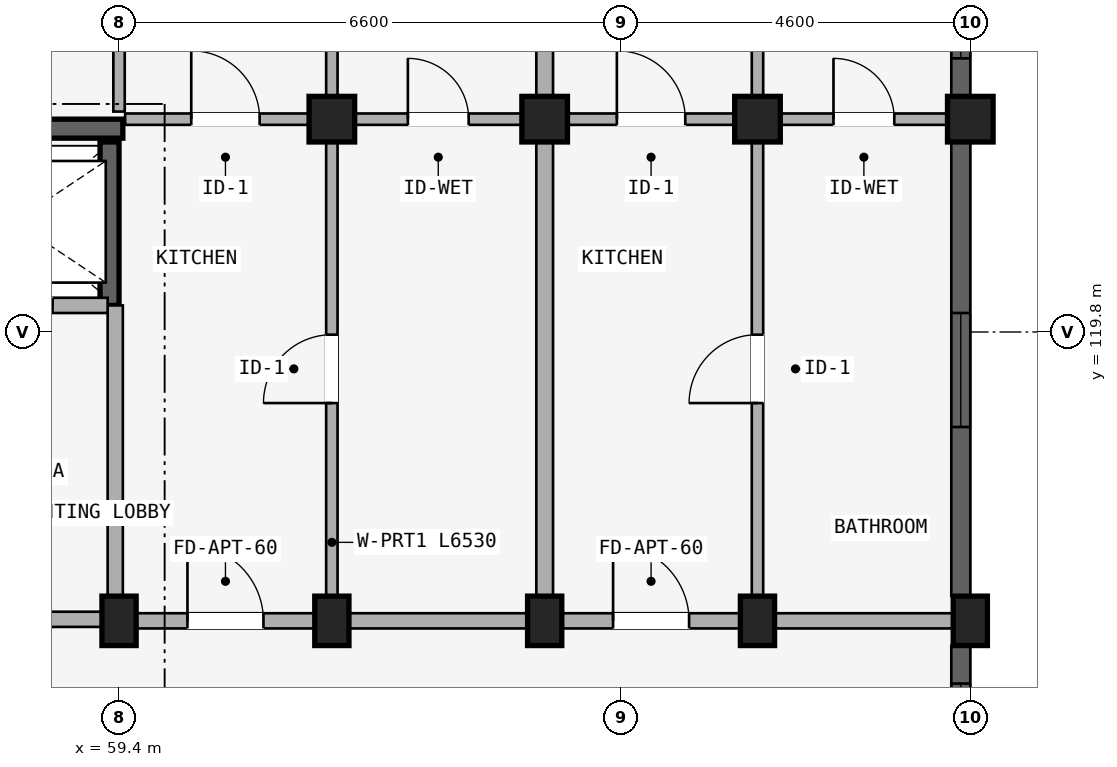
"""IFC4 building model, lengths in metres.
Left out: names, types, materials, properties, quantities, classifications, styles, units other than length and angle.
Written with IfcOpenShell. Run it as: python <this file> out.ifc"""

import sys

from ifc_helpers import new_model, si_unit, direction, frame, frame_2d, origin, origin_2d, place, context, subcontext, project, spatial, rectangle, extrude, element, fill, save


model = new_model("IFC4")
c1 = context("Model", 3, precision=1e-05, world=origin(), true_north=direction((0.0, 1.0)))
c2 = subcontext(c1, "Body", "Model", "MODEL_VIEW")
j1 = project(units=[si_unit("LENGTHUNIT", "METRE"), si_unit("PLANEANGLEUNIT", "RADIAN")], contexts=[c1])
p1 = place(None, origin())
s1 = spatial("IfcSite", under=j1, at=p1, CompositionType="ELEMENT")
p2 = place(p1, origin())
s2 = spatial("IfcBuilding", under=s1, at=p2, CompositionType="ELEMENT")
p3 = place(p2, frame((0.0, 0.0, 37.05)))
s3 = spatial("IfcBuildingStorey", under=s2, at=p3, CompositionType="ELEMENT", Elevation=37.05)
p4 = place(p3, frame((56.65, 122.475, 0.0), z_axis=(0.0, 0.0, 1.0), x_axis=(1.0, 0.0, 0.0)))
e1 = element("IfcWall", 1, at=p4, inside=s3, PredefinedType="SHEAR", context=c2, shape_type="SweptSolid", body=[
    extrude(rectangle(XDim=2.8, YDim=0.25, at=frame_2d((1.4, 0.0))), origin(), (0.0, 0.0, 1.0), 2.93),
])
p5 = place(p3, frame((59.275, 120.15, 0.0), z_axis=(0.0, 0.0, 1.0), x_axis=(0.0, 1.0, 0.0)))
e2 = element("IfcWall", 2, at=p5, inside=s3, PredefinedType="SHEAR", context=c2, shape_type="SweptSolid", body=[
    extrude(rectangle(XDim=2.15, YDim=0.25, at=frame_2d((1.075, 0.0))), origin(), (0.0, 0.0, 1.0), 2.93),
])
for number, where, z_axis, x_axis in (
    (3, (59.4, 116.0, 0.0), (0.0, 0.0, 1.0), (1.0, 0.0, 0.0)),
    (4, (62.2, 116.0, 0.0), (0.0, 0.0, 1.0), (1.0, 0.0, 0.0)),
):
    element("IfcColumn", number, at=place(p3, frame(where, z_axis=z_axis, x_axis=x_axis)), inside=s3, PredefinedType="COLUMN", context=c2, shape_type="SweptSolid", body=[
        extrude(rectangle(XDim=0.45, YDim=0.65, at=origin_2d()), origin(), (0.0, 0.0, 1.0), 2.93),
    ])
p6 = place(p3, frame((62.2, 122.6, 0.0), z_axis=(0.0, 0.0, 1.0), x_axis=(1.0, 0.0, 0.0)))
e5 = element("IfcColumn", 5, at=p6, inside=s3, PredefinedType="COLUMN", context=c2, shape_type="SweptSolid", body=[
    extrude(rectangle(XDim=0.6, YDim=0.6, at=origin_2d()), origin(), (0.0, 0.0, 1.0), 2.93),
])
p7 = place(p3, frame((65.0, 116.0, 0.0), z_axis=(0.0, 0.0, 1.0), x_axis=(1.0, 0.0, 0.0)))
e6 = element("IfcColumn", 6, at=p7, inside=s3, PredefinedType="COLUMN", context=c2, shape_type="SweptSolid", body=[
    extrude(rectangle(XDim=0.45, YDim=0.65, at=origin_2d()), origin(), (0.0, 0.0, 1.0), 2.93),
])
p8 = place(p3, frame((65.0, 122.6, 0.0), z_axis=(0.0, 0.0, 1.0), x_axis=(1.0, 0.0, 0.0)))
e7 = element("IfcColumn", 7, at=p8, inside=s3, PredefinedType="COLUMN", context=c2, shape_type="SweptSolid", body=[
    extrude(rectangle(XDim=0.6, YDim=0.6, at=origin_2d()), origin(), (0.0, 0.0, 1.0), 2.93),
])
p9 = place(p3, frame((67.8, 116.0, 0.0), z_axis=(0.0, 0.0, 1.0), x_axis=(1.0, 0.0, 0.0)))
e8 = element("IfcColumn", 8, at=p9, inside=s3, PredefinedType="COLUMN", context=c2, shape_type="SweptSolid", body=[
    extrude(rectangle(XDim=0.45, YDim=0.65, at=origin_2d()), origin(), (0.0, 0.0, 1.0), 2.93),
])
p10 = place(p3, frame((67.8, 122.6, 0.0), z_axis=(0.0, 0.0, 1.0), x_axis=(1.0, 0.0, 0.0)))
e9 = element("IfcColumn", 9, at=p10, inside=s3, PredefinedType="COLUMN", context=c2, shape_type="SweptSolid", body=[
    extrude(rectangle(XDim=0.6, YDim=0.6, at=origin_2d()), origin(), (0.0, 0.0, 1.0), 2.93),
])
p11 = place(p3, frame((70.6, 116.0, 0.0), z_axis=(0.0, 0.0, 1.0), x_axis=(1.0, 0.0, 0.0)))
e10 = element("IfcColumn", 10, at=p11, inside=s3, PredefinedType="COLUMN", context=c2, shape_type="SweptSolid", body=[
    extrude(rectangle(XDim=0.45, YDim=0.65, at=origin_2d()), origin(), (0.0, 0.0, 1.0), 2.93),
])
p12 = place(p3, frame((70.6, 122.6, 0.0), z_axis=(0.0, 0.0, 1.0), x_axis=(1.0, 0.0, 0.0)))
e11 = element("IfcColumn", 11, at=p12, inside=s3, PredefinedType="COLUMN", context=c2, shape_type="SweptSolid", body=[
    extrude(rectangle(XDim=0.6, YDim=0.6, at=origin_2d()), origin(), (0.0, 0.0, 1.0), 2.93),
])
p13 = place(p3, frame((53.7, 116.02, 0.0), z_axis=(0.0, 0.0, 1.0), x_axis=(1.0, 0.0, 0.0)))
e12 = element("IfcWall", 12, at=p13, inside=s3, PredefinedType="STANDARD", context=c2, shape_type="SweptSolid", body=[
    extrude(rectangle(XDim=5.65, YDim=0.2, at=frame_2d((2.825, 0.0))), origin(), (0.0, 0.0, 1.0), 2.372),
])
p14 = place(p13, frame((1.923, 0.0, 0.0)))
e13 = element("IfcOpeningElement", 13, at=p14, cuts=e12, PredefinedType="OPENING", context=c2, shape_type="SweptSolid", body=[
    extrude(rectangle(XDim=1.24, YDim=2.15, at=frame_2d((0.62, 1.075))), frame((0.0, 0.11, 0.0), z_axis=(0.0, -1.0, 0.0), x_axis=(1.0, 0.0, 0.0)), (0.0, 0.0, 1.0), 0.22),
])
p15 = place(p3, frame((59.35, 116.02, 0.0), z_axis=(0.0, 0.0, 1.0), x_axis=(0.0, 1.0, 0.0)))
e14 = element("IfcWall", 14, at=p15, inside=s3, PredefinedType="STANDARD", context=c2, shape_type="SweptSolid", body=[
    extrude(rectangle(XDim=4.13, YDim=0.2, at=frame_2d((2.065, 0.0))), origin(), (0.0, 0.0, 1.0), 2.372),
])
p16 = place(p3, frame((56.7, 120.15, 0.0), z_axis=(0.0, 0.0, 1.0), x_axis=(1.0, 0.0, 0.0)))
e15 = element("IfcWall", 15, at=p16, inside=s3, PredefinedType="STANDARD", context=c2, shape_type="SweptSolid", body=[
    extrude(rectangle(XDim=2.55, YDim=0.2, at=frame_2d((1.275, 0.0))), origin(), (0.0, 0.0, 1.0), 2.372),
])
p17 = place(p16, frame((0.725, 0.0, 0.0)))
e16 = element("IfcOpeningElement", 16, at=p17, cuts=e15, PredefinedType="OPENING", context=c2, shape_type="SweptSolid", body=[
    extrude(rectangle(XDim=1.1, YDim=2.15, at=frame_2d((0.55, 1.075))), frame((0.0, 0.11, 0.0), z_axis=(0.0, -1.0, 0.0), x_axis=(1.0, 0.0, 0.0)), (0.0, 0.0, 1.0), 0.22),
])
p18 = place(p3, frame((59.4, 116.0, 0.0), z_axis=(0.0, 0.0, 1.0), x_axis=(1.0, 0.0, 0.0)))
e17 = element("IfcWall", 17, at=p18, inside=s3, PredefinedType="STANDARD", context=c2, shape_type="SweptSolid", body=[
    extrude(rectangle(XDim=2.8, YDim=0.2, at=frame_2d((1.4, 0.0))), origin(), (0.0, 0.0, 1.0), 2.372),
])
p19 = place(p18, frame((0.9, 0.0, 0.0)))
e18 = element("IfcOpeningElement", 18, at=p19, cuts=e17, PredefinedType="OPENING", context=c2, shape_type="SweptSolid", body=[
    extrude(rectangle(XDim=1.0, YDim=2.15, at=frame_2d((0.5, 1.075))), frame((0.0, 0.11, 0.0), z_axis=(0.0, -1.0, 0.0), x_axis=(1.0, 0.0, 0.0)), (0.0, 0.0, 1.0), 0.22),
])
p20 = place(p3, frame((59.48, 122.6, 0.0), z_axis=(0.0, 0.0, 1.0), x_axis=(1.0, 0.0, 0.0)))
e19 = element("IfcWall", 19, at=p20, inside=s3, PredefinedType="PLUMBINGWALL", context=c2, shape_type="SweptSolid", body=[
    extrude(rectangle(XDim=2.64, YDim=0.15, at=frame_2d((1.32, 0.0))), origin(), (0.0, 0.0, 1.0), 2.372),
])
p21 = place(p20, frame((0.87, 0.0, 0.0)))
e20 = element("IfcOpeningElement", 20, at=p21, cuts=e19, PredefinedType="OPENING", context=c2, shape_type="SweptSolid", body=[
    extrude(rectangle(XDim=0.9, YDim=2.1, at=frame_2d((0.45, 1.05))), frame((0.0, 0.085, 0.0), z_axis=(0.0, -1.0, 0.0), x_axis=(1.0, 0.0, 0.0)), (0.0, 0.0, 1.0), 0.17),
])
p22 = place(p3, frame((62.2, 116.0, 0.0), z_axis=(0.0, 0.0, 1.0), x_axis=(1.0, 0.0, 0.0)))
e21 = element("IfcWall", 21, at=p22, inside=s3, PredefinedType="STANDARD", context=c2, shape_type="SweptSolid", body=[
    extrude(rectangle(XDim=2.8, YDim=0.2, at=frame_2d((1.4, 0.0))), origin(), (0.0, 0.0, 1.0), 2.372),
])
p23 = place(p3, frame((62.28, 122.6, 0.0), z_axis=(0.0, 0.0, 1.0), x_axis=(1.0, 0.0, 0.0)))
e22 = element("IfcWall", 22, at=p23, inside=s3, PredefinedType="PLUMBINGWALL", context=c2, shape_type="SweptSolid", body=[
    extrude(rectangle(XDim=2.64, YDim=0.15, at=frame_2d((1.32, 0.0))), origin(), (0.0, 0.0, 1.0), 2.372),
])
p24 = place(p23, frame((0.92, 0.0, 0.0)))
e23 = element("IfcOpeningElement", 23, at=p24, cuts=e22, PredefinedType="OPENING", context=c2, shape_type="SweptSolid", body=[
    extrude(rectangle(XDim=0.8, YDim=2.1, at=frame_2d((0.4, 1.05))), frame((0.0, 0.085, 0.0), z_axis=(0.0, -1.0, 0.0), x_axis=(1.0, 0.0, 0.0)), (0.0, 0.0, 1.0), 0.17),
])
p25 = place(p3, frame((65.0, 116.0, 0.0), z_axis=(0.0, 0.0, 1.0), x_axis=(1.0, 0.0, 0.0)))
e24 = element("IfcWall", 24, at=p25, inside=s3, PredefinedType="STANDARD", context=c2, shape_type="SweptSolid", body=[
    extrude(rectangle(XDim=2.8, YDim=0.2, at=frame_2d((1.4, 0.0))), origin(), (0.0, 0.0, 1.0), 2.372),
])
p26 = place(p25, frame((0.9, 0.0, 0.0)))
e25 = element("IfcOpeningElement", 25, at=p26, cuts=e24, PredefinedType="OPENING", context=c2, shape_type="SweptSolid", body=[
    extrude(rectangle(XDim=1.0, YDim=2.15, at=frame_2d((0.5, 1.075))), frame((0.0, 0.11, 0.0), z_axis=(0.0, -1.0, 0.0), x_axis=(1.0, 0.0, 0.0)), (0.0, 0.0, 1.0), 0.22),
])
p27 = place(p3, frame((65.08, 122.6, 0.0), z_axis=(0.0, 0.0, 1.0), x_axis=(1.0, 0.0, 0.0)))
e26 = element("IfcWall", 26, at=p27, inside=s3, PredefinedType="PLUMBINGWALL", context=c2, shape_type="SweptSolid", body=[
    extrude(rectangle(XDim=2.64, YDim=0.15, at=frame_2d((1.32, 0.0))), origin(), (0.0, 0.0, 1.0), 2.372),
])
p28 = place(p27, frame((0.87, 0.0, 0.0)))
e27 = element("IfcOpeningElement", 27, at=p28, cuts=e26, PredefinedType="OPENING", context=c2, shape_type="SweptSolid", body=[
    extrude(rectangle(XDim=0.9, YDim=2.1, at=frame_2d((0.45, 1.05))), frame((0.0, 0.085, 0.0), z_axis=(0.0, -1.0, 0.0), x_axis=(1.0, 0.0, 0.0)), (0.0, 0.0, 1.0), 0.17),
])
p29 = place(p3, frame((67.8, 116.0, 0.0), z_axis=(0.0, 0.0, 1.0), x_axis=(1.0, 0.0, 0.0)))
e28 = element("IfcWall", 28, at=p29, inside=s3, PredefinedType="STANDARD", context=c2, shape_type="SweptSolid", body=[
    extrude(rectangle(XDim=2.8, YDim=0.2, at=frame_2d((1.4, 0.0))), origin(), (0.0, 0.0, 1.0), 2.372),
])
p30 = place(p3, frame((67.88, 122.6, 0.0), z_axis=(0.0, 0.0, 1.0), x_axis=(1.0, 0.0, 0.0)))
e29 = element("IfcWall", 29, at=p30, inside=s3, PredefinedType="PLUMBINGWALL", context=c2, shape_type="SweptSolid", body=[
    extrude(rectangle(XDim=2.64, YDim=0.15, at=frame_2d((1.32, 0.0))), origin(), (0.0, 0.0, 1.0), 2.372),
])
p31 = place(p30, frame((0.92, 0.0, 0.0)))
e30 = element("IfcOpeningElement", 30, at=p31, cuts=e29, PredefinedType="OPENING", context=c2, shape_type="SweptSolid", body=[
    extrude(rectangle(XDim=0.8, YDim=2.1, at=frame_2d((0.4, 1.05))), frame((0.0, 0.085, 0.0), z_axis=(0.0, -1.0, 0.0), x_axis=(1.0, 0.0, 0.0)), (0.0, 0.0, 1.0), 0.17),
])
p32 = place(p3, frame((59.4, 122.7, 0.0), z_axis=(0.0, 0.0, 1.0), x_axis=(0.0, 1.0, 0.0)))
e31 = element("IfcWall", 31, at=p32, inside=s3, PredefinedType="PARTITIONING", context=c2, shape_type="SweptSolid", body=[
    extrude(rectangle(XDim=10.82, YDim=0.15, at=frame_2d((5.41, 0.0))), origin(), (0.0, 0.0, 1.0), 2.372),
])
p33 = place(p32, frame((0.899, 0.0, 0.0)))
e32 = element("IfcOpeningElement", 32, at=p33, cuts=e31, PredefinedType="OPENING", context=c2, shape_type="SweptSolid", body=[
    extrude(rectangle(XDim=0.8, YDim=2.1, at=frame_2d((0.4, 1.05))), frame((0.0, 0.085, 0.0), z_axis=(0.0, -1.0, 0.0), x_axis=(1.0, 0.0, 0.0)), (0.0, 0.0, 1.0), 0.17),
])
p34 = place(p3, frame((62.2, 116.05, 0.0), z_axis=(0.0, 0.0, 1.0), x_axis=(0.0, 1.0, 0.0)))
e33 = element("IfcWall", 33, at=p34, inside=s3, PredefinedType="PARTITIONING", context=c2, shape_type="SweptSolid", body=[
    extrude(rectangle(XDim=6.53, YDim=0.15, at=frame_2d((3.265, 0.0))), origin(), (0.0, 0.0, 1.0), 2.372),
])
p35 = place(p34, frame((2.815, 0.0, 0.0)))
e34 = element("IfcOpeningElement", 34, at=p35, cuts=e33, PredefinedType="OPENING", context=c2, shape_type="SweptSolid", body=[
    extrude(rectangle(XDim=0.9, YDim=2.1, at=frame_2d((0.45, 1.05))), frame((0.0, 0.085, 0.0), z_axis=(0.0, -1.0, 0.0), x_axis=(1.0, 0.0, 0.0)), (0.0, 0.0, 1.0), 0.17),
])
p36 = place(p3, frame((62.2, 122.7, 0.0), z_axis=(0.0, 0.0, 1.0), x_axis=(0.0, 1.0, 0.0)))
e35 = element("IfcWall", 35, at=p36, inside=s3, PredefinedType="PARTITIONING", context=c2, shape_type="SweptSolid", body=[
    extrude(rectangle(XDim=10.82, YDim=0.15, at=frame_2d((5.41, 0.0))), origin(), (0.0, 0.0, 1.0), 2.372),
])
p37 = place(p36, frame((0.899, 0.0, 0.0)))
e36 = element("IfcOpeningElement", 36, at=p37, cuts=e35, PredefinedType="OPENING", context=c2, shape_type="SweptSolid", body=[
    extrude(rectangle(XDim=0.8, YDim=2.1, at=frame_2d((0.4, 1.05))), frame((0.0, 0.085, 0.0), z_axis=(0.0, -1.0, 0.0), x_axis=(1.0, 0.0, 0.0)), (0.0, 0.0, 1.0), 0.17),
])
p38 = place(p3, frame((65.0, 116.05, 0.0), z_axis=(0.0, 0.0, 1.0), x_axis=(0.0, 1.0, 0.0)))
e37 = element("IfcWall", 37, at=p38, inside=s3, PredefinedType="STANDARD", context=c2, shape_type="SweptSolid", body=[
    extrude(rectangle(XDim=6.53, YDim=0.22, at=frame_2d((3.265, 0.0))), origin(), (0.0, 0.0, 1.0), 2.372),
])
p39 = place(p3, frame((65.0, 122.7, 0.0), z_axis=(0.0, 0.0, 1.0), x_axis=(0.0, 1.0, 0.0)))
e38 = element("IfcWall", 38, at=p39, inside=s3, PredefinedType="STANDARD", context=c2, shape_type="SweptSolid", body=[
    extrude(rectangle(XDim=10.82, YDim=0.22, at=frame_2d((5.41, 0.0))), origin(), (0.0, 0.0, 1.0), 2.372),
])
p40 = place(p3, frame((67.8, 116.05, 0.0), z_axis=(0.0, 0.0, 1.0), x_axis=(0.0, 1.0, 0.0)))
e39 = element("IfcWall", 39, at=p40, inside=s3, PredefinedType="PARTITIONING", context=c2, shape_type="SweptSolid", body=[
    extrude(rectangle(XDim=6.53, YDim=0.15, at=frame_2d((3.265, 0.0))), origin(), (0.0, 0.0, 1.0), 2.372),
])
p41 = place(p40, frame((2.815, 0.0, 0.0)))
e40 = element("IfcOpeningElement", 40, at=p41, cuts=e39, PredefinedType="OPENING", context=c2, shape_type="SweptSolid", body=[
    extrude(rectangle(XDim=0.9, YDim=2.1, at=frame_2d((0.45, 1.05))), frame((0.0, 0.085, 0.0), z_axis=(0.0, -1.0, 0.0), x_axis=(1.0, 0.0, 0.0)), (0.0, 0.0, 1.0), 0.17),
])
p42 = place(p3, frame((67.8, 122.7, 0.0), z_axis=(0.0, 0.0, 1.0), x_axis=(0.0, 1.0, 0.0)))
e41 = element("IfcWall", 41, at=p42, inside=s3, PredefinedType="PARTITIONING", context=c2, shape_type="SweptSolid", body=[
    extrude(rectangle(XDim=10.82, YDim=0.15, at=frame_2d((5.41, 0.0))), origin(), (0.0, 0.0, 1.0), 2.372),
])
p43 = place(p42, frame((0.899, 0.0, 0.0)))
e42 = element("IfcOpeningElement", 42, at=p43, cuts=e41, PredefinedType="OPENING", context=c2, shape_type="SweptSolid", body=[
    extrude(rectangle(XDim=0.8, YDim=2.1, at=frame_2d((0.4, 1.05))), frame((0.0, 0.085, 0.0), z_axis=(0.0, -1.0, 0.0), x_axis=(1.0, 0.0, 0.0)), (0.0, 0.0, 1.0), 0.17),
])
p44 = place(p3, frame((70.475, 113.928, 0.0), z_axis=(0.0, 0.0, 1.0), x_axis=(0.0, 1.0, 0.0)))
e43 = element("IfcWall", 43, at=p44, inside=s3, PredefinedType="STANDARD", context=c2, shape_type="SweptSolid", body=[
    extrude(rectangle(XDim=1.743, YDim=0.25, at=frame_2d((0.872, 0.0))), origin(), (0.0, 0.0, 1.0), 2.372),
])
p45 = place(p44, frame((0.497, 0.0, 0.88)))
e44 = element("IfcOpeningElement", 44, at=p45, cuts=e43, PredefinedType="OPENING", context=c2, shape_type="SweptSolid", body=[
    extrude(rectangle(XDim=0.75, YDim=1.05, at=frame_2d((0.375, 0.525))), frame((0.0, 0.135, 0.0), z_axis=(0.0, -1.0, 0.0), x_axis=(1.0, 0.0, 0.0)), (0.0, 0.0, 1.0), 0.27),
])
p46 = place(p3, frame((70.475, 116.329, 0.0), z_axis=(0.0, 0.0, 1.0), x_axis=(0.0, 1.0, 0.0)))
e45 = element("IfcWall", 45, at=p46, inside=s3, PredefinedType="STANDARD", context=c2, shape_type="SweptSolid", body=[
    extrude(rectangle(XDim=5.968, YDim=0.25, at=frame_2d((2.984, 0.0))), origin(), (0.0, 0.0, 1.0), 2.372),
])
p47 = place(p46, frame((2.221, 0.0, 0.522)))
e46 = element("IfcOpeningElement", 46, at=p47, cuts=e45, PredefinedType="OPENING", context=c2, shape_type="SweptSolid", body=[
    extrude(rectangle(XDim=1.5, YDim=1.65, at=frame_2d((0.75, 0.825))), frame((0.0, 0.135, 0.0), z_axis=(0.0, -1.0, 0.0), x_axis=(1.0, 0.0, 0.0)), (0.0, 0.0, 1.0), 0.27),
])
p48 = place(p3, frame((70.475, 122.904, 0.0), z_axis=(0.0, 0.0, 1.0), x_axis=(0.0, 1.0, 0.0)))
e47 = element("IfcWall", 47, at=p48, inside=s3, PredefinedType="STANDARD", context=c2, shape_type="SweptSolid", body=[
    extrude(rectangle(XDim=2.193, YDim=0.25, at=frame_2d((1.096, 0.0))), origin(), (0.0, 0.0, 1.0), 2.372),
])
p49 = place(p48, frame((0.497, 0.0, 0.672)))
e48 = element("IfcOpeningElement", 48, at=p49, cuts=e47, PredefinedType="OPENING", context=c2, shape_type="SweptSolid", body=[
    extrude(rectangle(XDim=1.2, YDim=1.5, at=frame_2d((0.6, 0.75))), frame((0.0, 0.135, 0.0), z_axis=(0.0, -1.0, 0.0), x_axis=(1.0, 0.0, 0.0)), (0.0, 0.0, 1.0), 0.27),
])
p50 = place(p45, origin())
e49 = element("IfcWindow", 49, at=p50, inside=s3, PartitioningType="SINGLE_PANEL", PredefinedType="WINDOW", context=c2, shape_type="SweptSolid", body=[
    extrude(rectangle(XDim=0.75, YDim=1.05, at=frame_2d((0.375, 0.525))), frame((0.0, 0.03, 0.0), z_axis=(0.0, -1.0, 0.0), x_axis=(1.0, 0.0, 0.0)), (0.0, 0.0, 1.0), 0.06),
])
fill(e44, e49)
p51 = place(p47, origin())
e50 = element("IfcWindow", 50, at=p51, inside=s3, PartitioningType="DOUBLE_PANEL_VERTICAL", PredefinedType="WINDOW", context=c2, shape_type="SweptSolid", body=[
    extrude(rectangle(XDim=1.5, YDim=1.65, at=frame_2d((0.75, 0.825))), frame((0.0, 0.03, 0.0), z_axis=(0.0, -1.0, 0.0), x_axis=(1.0, 0.0, 0.0)), (0.0, 0.0, 1.0), 0.06),
])
fill(e46, e50)
p52 = place(p49, origin())
e51 = element("IfcWindow", 51, at=p52, inside=s3, PartitioningType="SINGLE_PANEL", PredefinedType="WINDOW", context=c2, shape_type="SweptSolid", body=[
    extrude(rectangle(XDim=1.2, YDim=1.5, at=frame_2d((0.6, 0.75))), frame((0.0, 0.03, 0.0), z_axis=(0.0, -1.0, 0.0), x_axis=(1.0, 0.0, 0.0)), (0.0, 0.0, 1.0), 0.06),
])
fill(e48, e51)
p53 = place(p17, origin())
e52 = element("IfcDoor", 52, at=p53, inside=s3, OperationType="SLIDING_TO_LEFT", PredefinedType="DOOR", context=c2, shape_type="SweptSolid", body=[
    extrude(rectangle(XDim=1.1, YDim=2.15, at=frame_2d((0.55, 1.075))), frame((0.0, 0.025, 0.0), z_axis=(0.0, -1.0, 0.0), x_axis=(1.0, 0.0, 0.0)), (0.0, 0.0, 1.0), 0.05),
])
fill(e16, e52)
p54 = place(p21, origin())
e53 = element("IfcDoor", 53, at=p54, inside=s3, OperationType="SINGLE_SWING_LEFT", PredefinedType="DOOR", context=c2, shape_type="SweptSolid", body=[
    extrude(rectangle(XDim=0.9, YDim=2.1, at=frame_2d((0.45, 1.05))), frame((0.0, 0.025, 0.0), z_axis=(0.0, -1.0, 0.0), x_axis=(1.0, 0.0, 0.0)), (0.0, 0.0, 1.0), 0.05),
])
fill(e20, e53)
p55 = place(p19, frame((1.0, 0.0, 0.0), z_axis=(0.0, 0.0, 1.0), x_axis=(-1.0, 0.0, 0.0)))
e54 = element("IfcDoor", 54, at=p55, inside=s3, OperationType="SINGLE_SWING_RIGHT", PredefinedType="DOOR", context=c2, shape_type="SweptSolid", body=[
    extrude(rectangle(XDim=1.0, YDim=2.15, at=frame_2d((0.5, 1.075))), frame((0.0, 0.025, 0.0), z_axis=(0.0, -1.0, 0.0), x_axis=(1.0, 0.0, 0.0)), (0.0, 0.0, 1.0), 0.05),
])
fill(e18, e54)
p56 = place(p24, origin())
e55 = element("IfcDoor", 55, at=p56, inside=s3, OperationType="SINGLE_SWING_LEFT", PredefinedType="DOOR", context=c2, shape_type="SweptSolid", body=[
    extrude(rectangle(XDim=0.8, YDim=2.1, at=frame_2d((0.4, 1.05))), frame((0.0, 0.025, 0.0), z_axis=(0.0, -1.0, 0.0), x_axis=(1.0, 0.0, 0.0)), (0.0, 0.0, 1.0), 0.05),
])
fill(e23, e55)
p57 = place(p28, origin())
e56 = element("IfcDoor", 56, at=p57, inside=s3, OperationType="SINGLE_SWING_LEFT", PredefinedType="DOOR", context=c2, shape_type="SweptSolid", body=[
    extrude(rectangle(XDim=0.9, YDim=2.1, at=frame_2d((0.45, 1.05))), frame((0.0, 0.025, 0.0), z_axis=(0.0, -1.0, 0.0), x_axis=(1.0, 0.0, 0.0)), (0.0, 0.0, 1.0), 0.05),
])
fill(e27, e56)
p58 = place(p26, frame((1.0, 0.0, 0.0), z_axis=(0.0, 0.0, 1.0), x_axis=(-1.0, 0.0, 0.0)))
e57 = element("IfcDoor", 57, at=p58, inside=s3, OperationType="SINGLE_SWING_RIGHT", PredefinedType="DOOR", context=c2, shape_type="SweptSolid", body=[
    extrude(rectangle(XDim=1.0, YDim=2.15, at=frame_2d((0.5, 1.075))), frame((0.0, 0.025, 0.0), z_axis=(0.0, -1.0, 0.0), x_axis=(1.0, 0.0, 0.0)), (0.0, 0.0, 1.0), 0.05),
])
fill(e25, e57)
p59 = place(p31, origin())
e58 = element("IfcDoor", 58, at=p59, inside=s3, OperationType="SINGLE_SWING_LEFT", PredefinedType="DOOR", context=c2, shape_type="SweptSolid", body=[
    extrude(rectangle(XDim=0.8, YDim=2.1, at=frame_2d((0.4, 1.05))), frame((0.0, 0.025, 0.0), z_axis=(0.0, -1.0, 0.0), x_axis=(1.0, 0.0, 0.0)), (0.0, 0.0, 1.0), 0.05),
])
fill(e30, e58)
p60 = place(p35, frame((0.9, 0.0, 0.0), z_axis=(0.0, 0.0, 1.0), x_axis=(-1.0, 0.0, 0.0)))
e59 = element("IfcDoor", 59, at=p60, inside=s3, OperationType="SINGLE_SWING_RIGHT", PredefinedType="DOOR", context=c2, shape_type="SweptSolid", body=[
    extrude(rectangle(XDim=0.9, YDim=2.1, at=frame_2d((0.45, 1.05))), frame((0.0, 0.025, 0.0), z_axis=(0.0, -1.0, 0.0), x_axis=(1.0, 0.0, 0.0)), (0.0, 0.0, 1.0), 0.05),
])
fill(e34, e59)
p61 = place(p41, origin())
e60 = element("IfcDoor", 60, at=p61, inside=s3, OperationType="SINGLE_SWING_LEFT", PredefinedType="DOOR", context=c2, shape_type="SweptSolid", body=[
    extrude(rectangle(XDim=0.9, YDim=2.1, at=frame_2d((0.45, 1.05))), frame((0.0, 0.025, 0.0), z_axis=(0.0, -1.0, 0.0), x_axis=(1.0, 0.0, 0.0)), (0.0, 0.0, 1.0), 0.05),
])
fill(e40, e60)
save(model, sys.argv[1])
